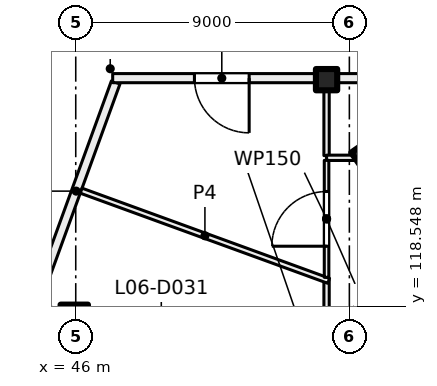
"""IFC4 building model, lengths in metres.
Left out: names, types, materials, properties, quantities, classifications, styles, units other than length and angle.
Written with IfcOpenShell. Run it as: python <this file> out.ifc"""

import sys

from ifc_helpers import new_model, si_unit, direction, frame, frame_2d, origin, origin_2d, place, context, subcontext, project, spatial, rectangle, hollow_rectangle, extrude, element, fill, save


model = new_model("IFC4")
c1 = context("Model", 3, precision=1e-05, world=origin(), true_north=direction((0.0, 1.0)))
c2 = subcontext(c1, "Body", "Model", "MODEL_VIEW")
j1 = project(units=[si_unit("LENGTHUNIT", "METRE"), si_unit("PLANEANGLEUNIT", "RADIAN")], contexts=[c1])
p1 = place(None, origin())
s1 = spatial("IfcSite", under=j1, at=p1, CompositionType="ELEMENT")
p2 = place(p1, origin())
s2 = spatial("IfcBuilding", under=s1, at=p2, CompositionType="ELEMENT")
p3 = place(p2, frame((0.0, 0.0, 31.5)))
s3 = spatial("IfcBuildingStorey", under=s2, at=p3, CompositionType="ELEMENT", Elevation=31.5)
p4 = place(p3, frame((56.036, 123.43, 0.0), z_axis=(0.0, 0.0, 1.0), x_axis=(0.573576436351, -0.819152044289, 0.0)))
e1 = element("IfcColumn", 1, at=p4, inside=s3, PredefinedType="COLUMN", context=c2, shape_type="SweptSolid", body=[
    extrude(hollow_rectangle(XDim=1.4, YDim=1.4, WallThickness=0.04, at=origin_2d()), origin(), (0.0, 0.0, 1.0), 4.0),
])
p5 = place(p3, frame((54.25, 126.0, 0.0), z_axis=(0.0, 0.0, 1.0), x_axis=(1.0, 0.0, 0.0)))
e2 = element("IfcColumn", 2, at=p5, inside=s3, PredefinedType="COLUMN", context=c2, shape_type="SweptSolid", body=[
    extrude(rectangle(XDim=0.7, YDim=0.7, at=origin_2d()), origin(), (0.0, 0.0, 1.0), 4.0),
])
p6 = place(p3, frame((45.952, 118.152, 0.0), z_axis=(0.0, 0.0, 1.0), x_axis=(1.0, 0.0, 0.0)))
e3 = element("IfcColumn", 3, at=p6, inside=s3, PredefinedType="COLUMN", context=c2, shape_type="SweptSolid", body=[
    extrude(rectangle(XDim=0.9, YDim=0.9, at=origin_2d()), origin(), (0.0, 0.0, 1.0), 4.0),
])
p7 = place(p3, frame((52.965, 115.598, 0.0), z_axis=(0.0, 0.0, 1.0), x_axis=(-0.939650555598, 0.342135694374, 0.0)))
e4 = element("IfcWall", 4, at=p7, inside=s3, PredefinedType="PARTITIONING", context=c2, shape_type="SweptSolid", body=[
    extrude(rectangle(XDim=8.836, YDim=0.175, at=frame_2d((4.418, 0.0))), origin(), (0.0, 0.0, 1.0), 3.625),
])
p8 = place(p7, frame((3.818, 0.0, 0.0)))
e5 = element("IfcOpeningElement", 5, at=p8, cuts=e4, PredefinedType="OPENING", context=c2, shape_type="SweptSolid", body=[
    extrude(rectangle(XDim=1.2, YDim=2.1, at=frame_2d((0.6, 1.05))), frame((0.0, 0.097, 0.0), z_axis=(0.0, -1.0, 0.0), x_axis=(1.0, 0.0, 0.0)), (0.0, 0.0, 1.0), 0.195),
])
p9 = place(p3, frame((47.314, 125.909, 0.0), z_axis=(0.0, 0.0, 1.0), x_axis=(-0.34198522802, -0.939705328183, 0.0)))
e6 = element("IfcWall", 6, at=p9, inside=s3, PredefinedType="PARTITIONING", context=c2, shape_type="SweptSolid", body=[
    extrude(rectangle(XDim=7.609, YDim=0.3, at=frame_2d((3.804, 0.0))), origin(), (0.0, 0.0, 1.0), 3.625),
])
p10 = place(p3, frame((54.25, 116.637, 0.0), z_axis=(0.0, 0.0, 1.0), x_axis=(0.0, 1.0, 0.0)))
e7 = element("IfcWall", 7, at=p10, inside=s3, PredefinedType="PARTITIONING", context=c2, shape_type="SweptSolid", body=[
    extrude(rectangle(XDim=2.776, YDim=0.175, at=frame_2d((1.388, 0.0))), origin(), (0.0, 0.0, 1.0), 3.625),
])
p11 = place(p3, frame((54.32, 119.384, 0.0), z_axis=(0.0, 0.0, 1.0), x_axis=(-0.939632908118, 0.342184157994, 0.0)))
e8 = element("IfcWall", 8, at=p11, inside=s3, PredefinedType="PARTITIONING", context=c2, shape_type="SweptSolid", body=[
    extrude(rectangle(XDim=8.665, YDim=0.175, at=frame_2d((4.333, 0.0))), origin(), (0.0, 0.0, 1.0), 3.625),
])
p12 = place(p3, frame((54.25, 123.502, 0.0), z_axis=(0.0, 0.0, 1.0), x_axis=(0.0, 1.0, 0.0)))
e9 = element("IfcWall", 9, at=p12, inside=s3, PredefinedType="PARTITIONING", context=c2, shape_type="SweptSolid", body=[
    extrude(rectangle(XDim=2.398, YDim=0.175, at=frame_2d((1.199, 0.0))), origin(), (0.0, 0.0, 1.0), 3.625),
])
p13 = place(p3, frame((54.25, 123.43, 0.0), z_axis=(0.0, 0.0, 1.0), x_axis=(1.0, 0.0, 0.0)))
e10 = element("IfcWall", 10, at=p13, inside=s3, PredefinedType="PARTITIONING", context=c2, shape_type="SweptSolid", body=[
    extrude(rectangle(XDim=8.912, YDim=0.175, at=frame_2d((4.456, 0.0))), origin(), (0.0, 0.0, 1.0), 3.625),
])
p14 = place(p13, frame((3.866, 0.0, 0.0)))
e11 = element("IfcOpeningElement", 11, at=p14, cuts=e10, PredefinedType="OPENING", context=c2, shape_type="SweptSolid", body=[
    extrude(rectangle(XDim=1.2, YDim=2.1, at=frame_2d((0.6, 1.05))), frame((0.0, 0.097, 0.0), z_axis=(0.0, -1.0, 0.0), x_axis=(1.0, 0.0, 0.0)), (0.0, 0.0, 1.0), 0.195),
])
p15 = place(p3, frame((54.25, 119.498, 0.0), z_axis=(0.0, 0.0, 1.0), x_axis=(0.0, 1.0, 0.0)))
e12 = element("IfcWall", 12, at=p15, inside=s3, PredefinedType="PARTITIONING", context=c2, shape_type="SweptSolid", body=[
    extrude(rectangle(XDim=3.848, YDim=0.15, at=frame_2d((1.924, 0.0))), origin(), (0.0, 0.0, 1.0), 3.625),
])
p16 = place(p15, frame((1.024, 0.0, 0.0)))
e13 = element("IfcOpeningElement", 13, at=p16, cuts=e12, PredefinedType="OPENING", context=c2, shape_type="SweptSolid", body=[
    extrude(rectangle(XDim=1.8, YDim=2.1, at=frame_2d((0.9, 1.05))), frame((0.0, 0.085, 0.0), z_axis=(0.0, -1.0, 0.0), x_axis=(1.0, 0.0, 0.0)), (0.0, 0.0, 1.0), 0.17),
])
p17 = place(p3, frame((91.0, 126.05, 0.0), z_axis=(0.0, 0.0, 1.0), x_axis=(-1.0, 0.0, 0.0)))
e14 = element("IfcWall", 14, at=p17, inside=s3, PredefinedType="PARTITIONING", context=c2, shape_type="SweptSolid", body=[
    extrude(rectangle(XDim=43.785, YDim=0.3, at=frame_2d((21.893, 0.0))), origin(), (0.0, 0.0, 1.0), 3.625),
])
p18 = place(p17, frame((2.125, 0.0, 0.0)))
e15 = element("IfcOpeningElement", 15, at=p18, cuts=e14, PredefinedType="OPENING", context=c2, shape_type="SweptSolid", body=[
    extrude(rectangle(XDim=1.0, YDim=2.1, at=frame_2d((0.5, 1.05))), frame((0.0, 0.16, 0.0), z_axis=(0.0, -1.0, 0.0), x_axis=(1.0, 0.0, 0.0)), (0.0, 0.0, 1.0), 0.32),
])
p19 = place(p17, frame((7.0, 0.0, 0.0)))
e16 = element("IfcOpeningElement", 16, at=p19, cuts=e14, PredefinedType="OPENING", context=c2, shape_type="SweptSolid", body=[
    extrude(rectangle(XDim=1.0, YDim=2.1, at=frame_2d((0.5, 1.05))), frame((0.0, 0.16, 0.0), z_axis=(0.0, -1.0, 0.0), x_axis=(1.0, 0.0, 0.0)), (0.0, 0.0, 1.0), 0.32),
])
p20 = place(p17, frame((11.5, 0.0, 0.0)))
e17 = element("IfcOpeningElement", 17, at=p20, cuts=e14, PredefinedType="OPENING", context=c2, shape_type="SweptSolid", body=[
    extrude(rectangle(XDim=1.0, YDim=2.1, at=frame_2d((0.5, 1.05))), frame((0.0, 0.16, 0.0), z_axis=(0.0, -1.0, 0.0), x_axis=(1.0, 0.0, 0.0)), (0.0, 0.0, 1.0), 0.32),
])
p21 = place(p17, frame((21.35, 0.0, 0.0)))
e18 = element("IfcOpeningElement", 18, at=p21, cuts=e14, PredefinedType="OPENING", context=c2, shape_type="SweptSolid", body=[
    extrude(rectangle(XDim=0.8, YDim=2.1, at=frame_2d((0.4, 1.05))), frame((0.0, 0.16, 0.0), z_axis=(0.0, -1.0, 0.0), x_axis=(1.0, 0.0, 0.0)), (0.0, 0.0, 1.0), 0.32),
])
p22 = place(p17, frame((16.75, 0.0, 0.0)))
e19 = element("IfcOpeningElement", 19, at=p22, cuts=e14, PredefinedType="OPENING", context=c2, shape_type="SweptSolid", body=[
    extrude(rectangle(XDim=1.0, YDim=2.1, at=frame_2d((0.5, 1.05))), frame((0.0, 0.16, 0.0), z_axis=(0.0, -1.0, 0.0), x_axis=(1.0, 0.0, 0.0)), (0.0, 0.0, 1.0), 0.32),
])
p23 = place(p17, frame((25.0, 0.0, 0.0)))
e20 = element("IfcOpeningElement", 20, at=p23, cuts=e14, PredefinedType="OPENING", context=c2, shape_type="SweptSolid", body=[
    extrude(rectangle(XDim=1.0, YDim=2.1, at=frame_2d((0.5, 1.05))), frame((0.0, 0.16, 0.0), z_axis=(0.0, -1.0, 0.0), x_axis=(1.0, 0.0, 0.0)), (0.0, 0.0, 1.0), 0.32),
])
p24 = place(p17, frame((39.296, 0.0, 0.0)))
e21 = element("IfcOpeningElement", 21, at=p24, cuts=e14, PredefinedType="OPENING", context=c2, shape_type="SweptSolid", body=[
    extrude(rectangle(XDim=1.8, YDim=2.1, at=frame_2d((0.9, 1.05))), frame((0.0, 0.16, 0.0), z_axis=(0.0, -1.0, 0.0), x_axis=(1.0, 0.0, 0.0)), (0.0, 0.0, 1.0), 0.32),
])
p25 = place(p16, origin())
e22 = element("IfcDoor", 22, at=p25, inside=s3, OperationType="DOUBLE_DOOR_SINGLE_SWING", PredefinedType="DOOR", context=c2, shape_type="SweptSolid", body=[
    extrude(rectangle(XDim=1.8, YDim=2.1, at=frame_2d((0.9, 1.05))), frame((0.0, 0.025, 0.0), z_axis=(0.0, -1.0, 0.0), x_axis=(1.0, 0.0, 0.0)), (0.0, 0.0, 1.0), 0.05),
])
fill(e13, e22)
p26 = place(p24, origin())
e23 = element("IfcDoor", 23, at=p26, inside=s3, OperationType="DOUBLE_DOOR_SINGLE_SWING", PredefinedType="DOOR", context=c2, shape_type="SweptSolid", body=[
    extrude(rectangle(XDim=1.8, YDim=2.1, at=frame_2d((0.9, 1.05))), frame((0.0, 0.025, 0.0), z_axis=(0.0, -1.0, 0.0), x_axis=(1.0, 0.0, 0.0)), (0.0, 0.0, 1.0), 0.05),
])
fill(e21, e23)
save(model, sys.argv[1])
